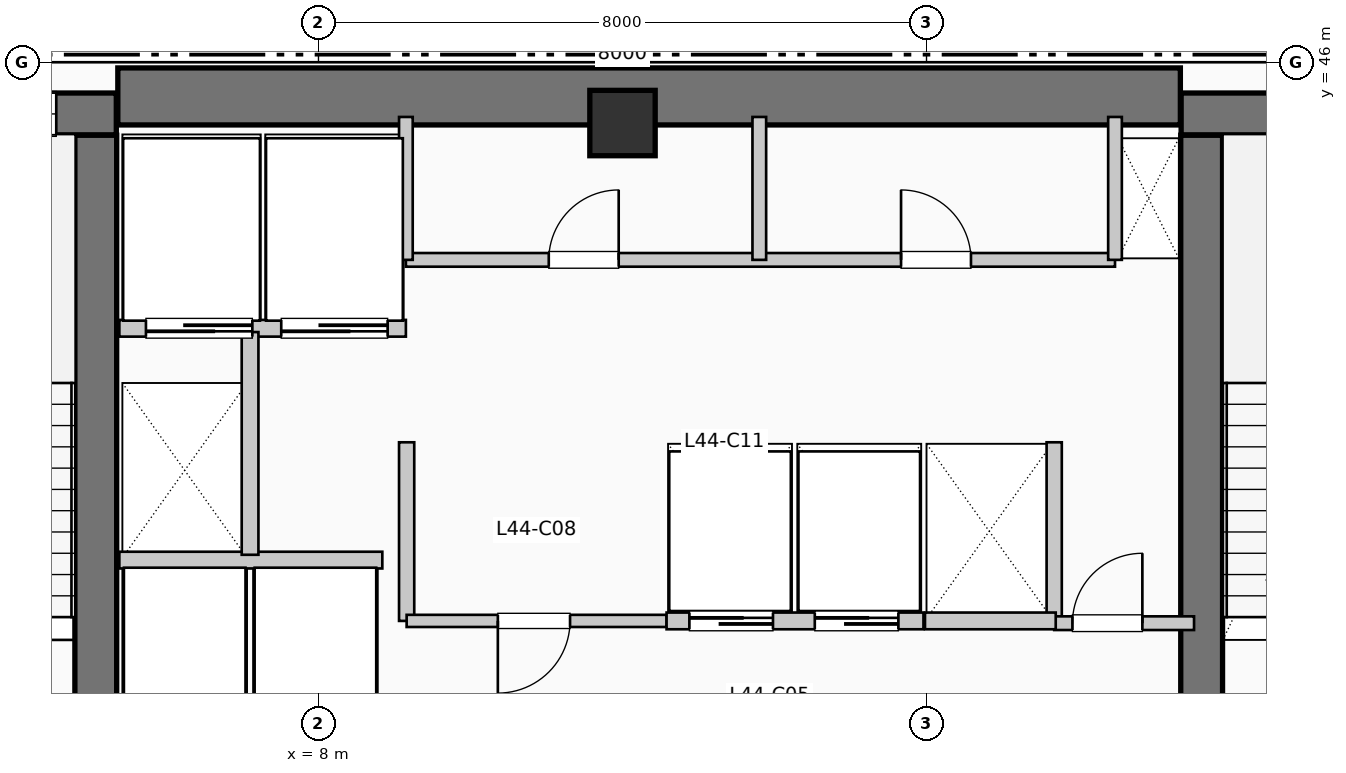
"""IFC4 building model, lengths in metres.
Left out: names, types, materials, properties, quantities, classifications, styles, units other than length and angle.
Written with IfcOpenShell. Run it as: python <this file> out.ifc"""

import sys

from ifc_helpers import new_model, si_unit, direction, frame, frame_2d, origin, origin_2d, place, context, subcontext, project, spatial, rectangle, extrude, element, fill, save


model = new_model("IFC4")
c1 = context("Model", 3, precision=1e-05, world=origin(), true_north=direction((0.0, 1.0)))
c2 = subcontext(c1, "Body", "Model", "MODEL_VIEW")
j1 = project(units=[si_unit("LENGTHUNIT", "METRE"), si_unit("PLANEANGLEUNIT", "RADIAN")], contexts=[c1])
p1 = place(None, origin())
s1 = spatial("IfcSite", under=j1, at=p1, CompositionType="ELEMENT")
p2 = place(p1, origin())
s2 = spatial("IfcBuilding", under=s1, at=p2, CompositionType="ELEMENT")
p3 = place(p2, frame((0.0, 0.0, 183.48)))
s3 = spatial("IfcBuildingStorey", under=s2, at=p3, CompositionType="ELEMENT", Elevation=183.48)
p4 = place(p3, frame((5.36, 45.55, 0.0), z_axis=(0.0, 0.0, 1.0), x_axis=(1.0, 0.0, 0.0)))
e1 = element("IfcWall", 1, at=p4, inside=s3, PredefinedType="SHEAR", context=c2, shape_type="SweptSolid", body=[
    extrude(rectangle(XDim=13.98, YDim=0.75, at=frame_2d((6.99, 0.0))), origin(), (0.0, 0.0, 1.0), 3.96),
])
p5 = place(p3, frame((5.07, 37.15, 0.0), z_axis=(0.0, 0.0, 1.0), x_axis=(0.0, 1.0, 0.0)))
e2 = element("IfcWall", 2, at=p5, inside=s3, PredefinedType="SHEAR", context=c2, shape_type="SweptSolid", body=[
    extrude(rectangle(XDim=7.89, YDim=0.55, at=frame_2d((3.945, 0.0))), origin(), (0.0, 0.0, 1.0), 3.96),
])
p6 = place(p3, frame((1.1, 45.32, 0.0), z_axis=(0.0, 0.0, 1.0), x_axis=(1.0, 0.0, 0.0)))
e3 = element("IfcWall", 3, at=p6, inside=s3, PredefinedType="SHEAR", context=c2, shape_type="SweptSolid", body=[
    extrude(rectangle(XDim=4.24, YDim=0.55, at=frame_2d((2.12, 0.0))), origin(), (0.0, 0.0, 1.0), 3.96),
])
p7 = place(p6, frame((2.05, 0.0, 1.05)))
e4 = element("IfcOpeningElement", 4, at=p7, cuts=e3, PredefinedType="OPENING", context=c2, shape_type="SweptSolid", body=[
    extrude(rectangle(XDim=1.4, YDim=1.8, at=frame_2d((0.7, 0.9))), frame((0.0, 0.285, 0.0), z_axis=(0.0, -1.0, 0.0), x_axis=(1.0, 0.0, 0.0)), (0.0, 0.0, 1.0), 0.57),
])
p8 = place(p3, frame((19.62, 37.15, 0.0), z_axis=(0.0, 0.0, 1.0), x_axis=(0.0, 1.0, 0.0)))
e5 = element("IfcWall", 5, at=p8, inside=s3, PredefinedType="SHEAR", context=c2, shape_type="SweptSolid", body=[
    extrude(rectangle(XDim=7.89, YDim=0.55, at=frame_2d((3.945, 0.0))), origin(), (0.0, 0.0, 1.0), 3.96),
])
p9 = place(p3, frame((19.35, 45.32, 0.0), z_axis=(0.0, 0.0, 1.0), x_axis=(1.0, 0.0, 0.0)))
e6 = element("IfcWall", 6, at=p9, inside=s3, PredefinedType="SHEAR", context=c2, shape_type="SweptSolid", body=[
    extrude(rectangle(XDim=3.69, YDim=0.55, at=frame_2d((1.845, 0.0))), origin(), (0.0, 0.0, 1.0), 3.96),
])
p10 = place(p9, frame((1.15, 0.0, 1.05)))
e7 = element("IfcOpeningElement", 7, at=p10, cuts=e6, PredefinedType="OPENING", context=c2, shape_type="SweptSolid", body=[
    extrude(rectangle(XDim=1.4, YDim=1.8, at=frame_2d((0.7, 0.9))), frame((0.0, 0.285, 0.0), z_axis=(0.0, -1.0, 0.0), x_axis=(1.0, 0.0, 0.0)), (0.0, 0.0, 1.0), 0.57),
])
p11 = place(p3, frame((12.0, 45.2, 0.0), z_axis=(0.0, 0.0, 1.0), x_axis=(1.0, 0.0, 0.0)))
e8 = element("IfcColumn", 8, at=p11, inside=s3, PredefinedType="COLUMN", context=c2, shape_type="SweptSolid", body=[
    extrude(rectangle(XDim=0.86, YDim=0.86, at=origin_2d()), origin(), (0.0, 0.0, 1.0), 3.96),
])
p12 = place(p3, frame((5.38, 39.45, 0.0), z_axis=(0.0, 0.0, 1.0), x_axis=(1.0, 0.0, 0.0)))
e9 = element("IfcWall", 9, at=p12, inside=s3, PredefinedType="PARTITIONING", context=c2, shape_type="SweptSolid", body=[
    extrude(rectangle(XDim=3.46, YDim=0.22, at=frame_2d((1.73, 0.0))), origin(), (0.0, 0.0, 1.0), 3.71),
])
p13 = place(p3, frame((5.38, 42.5, 0.0), z_axis=(0.0, 0.0, 1.0), x_axis=(1.0, 0.0, 0.0)))
e10 = element("IfcWall", 10, at=p13, inside=s3, PredefinedType="PARTITIONING", context=c2, shape_type="SweptSolid", body=[
    extrude(rectangle(XDim=3.77, YDim=0.22, at=frame_2d((1.885, 0.0))), origin(), (0.0, 0.0, 1.0), 3.71),
])
p14 = place(p13, frame((1.75, 0.0, 0.0), z_axis=(0.0, 0.0, 1.0), x_axis=(-1.0, 0.0, 0.0)))
e11 = element("IfcOpeningElement", 11, at=p14, cuts=e10, PredefinedType="OPENING", context=c2, shape_type="SweptSolid", body=[
    extrude(rectangle(XDim=1.4, YDim=2.2, at=frame_2d((0.7, 1.1))), frame((0.0, 0.12, 0.0), z_axis=(0.0, -1.0, 0.0), x_axis=(1.0, 0.0, 0.0)), (0.0, 0.0, 1.0), 0.24),
])
p15 = place(p13, frame((3.53, 0.0, 0.0), z_axis=(0.0, 0.0, 1.0), x_axis=(-1.0, 0.0, 0.0)))
e12 = element("IfcOpeningElement", 12, at=p15, cuts=e10, PredefinedType="OPENING", context=c2, shape_type="SweptSolid", body=[
    extrude(rectangle(XDim=1.4, YDim=2.2, at=frame_2d((0.7, 1.1))), frame((0.0, 0.12, 0.0), z_axis=(0.0, -1.0, 0.0), x_axis=(1.0, 0.0, 0.0)), (0.0, 0.0, 1.0), 0.24),
])
p16 = place(p3, frame((7.1, 39.52, 0.0), z_axis=(0.0, 0.0, 1.0), x_axis=(0.0, 1.0, 0.0)))
e13 = element("IfcWall", 13, at=p16, inside=s3, PredefinedType="PARTITIONING", context=c2, shape_type="SweptSolid", body=[
    extrude(rectangle(XDim=2.93, YDim=0.22, at=frame_2d((1.465, 0.0))), origin(), (0.0, 0.0, 1.0), 3.71),
])
for number, where, z_axis, x_axis in (
    (14, (9.16, 38.65, 0.0), (0.0, 0.0, 1.0), (0.0, 1.0, 0.0)),
    (15, (17.68, 38.65, 0.0), (0.0, 0.0, 1.0), (0.0, 1.0, 0.0)),
):
    element("IfcWall", number, at=place(p3, frame(where, z_axis=z_axis, x_axis=x_axis)), inside=s3, PredefinedType="PARTITIONING", context=c2, shape_type="SweptSolid", body=[
        extrude(rectangle(XDim=2.35, YDim=0.2, at=frame_2d((1.175, 0.0))), origin(), (0.0, 0.0, 1.0), 3.71),
    ])
p17 = place(p3, frame((17.68, 38.62, 0.0), z_axis=(0.0, 0.0, 1.0), x_axis=(1.0, 0.0, 0.0)))
e16 = element("IfcWall", 16, at=p17, inside=s3, PredefinedType="PARTITIONING", context=c2, shape_type="SweptSolid", body=[
    extrude(rectangle(XDim=1.84, YDim=0.18, at=frame_2d((0.92, 0.0))), origin(), (0.0, 0.0, 1.0), 3.71),
])
p18 = place(p17, frame((0.24, 0.0, 0.0)))
e17 = element("IfcOpeningElement", 17, at=p18, cuts=e16, PredefinedType="OPENING", context=c2, shape_type="SweptSolid", body=[
    extrude(rectangle(XDim=0.92, YDim=2.1, at=frame_2d((0.46, 1.05))), frame((0.0, 0.1, 0.0), z_axis=(0.0, -1.0, 0.0), x_axis=(1.0, 0.0, 0.0)), (0.0, 0.0, 1.0), 0.2),
])
p19 = place(p3, frame((9.16, 38.65, 0.0), z_axis=(0.0, 0.0, 1.0), x_axis=(1.0, 0.0, 0.0)))
e18 = element("IfcWall", 18, at=p19, inside=s3, PredefinedType="PARTITIONING", context=c2, shape_type="SweptSolid", body=[
    extrude(rectangle(XDim=3.42, YDim=0.16, at=frame_2d((1.71, 0.0))), origin(), (0.0, 0.0, 1.0), 3.71),
])
p20 = place(p19, frame((2.15, 0.0, 0.0), z_axis=(0.0, 0.0, 1.0), x_axis=(-1.0, 0.0, 0.0)))
e19 = element("IfcOpeningElement", 19, at=p20, cuts=e18, PredefinedType="OPENING", context=c2, shape_type="SweptSolid", body=[
    extrude(rectangle(XDim=0.95, YDim=2.15, at=frame_2d((0.475, 1.075))), frame((0.0, 0.09, 0.0), z_axis=(0.0, -1.0, 0.0), x_axis=(1.0, 0.0, 0.0)), (0.0, 0.0, 1.0), 0.18),
])
p21 = place(p3, frame((12.58, 38.65, 0.0), z_axis=(0.0, 0.0, 1.0), x_axis=(1.0, 0.0, 0.0)))
e20 = element("IfcWall", 20, at=p21, inside=s3, PredefinedType="PARTITIONING", context=c2, shape_type="SweptSolid", body=[
    extrude(rectangle(XDim=3.38, YDim=0.22, at=frame_2d((1.69, 0.0))), origin(), (0.0, 0.0, 1.0), 3.71),
])
p22 = place(p21, frame((0.3, 0.0, 0.0)))
e21 = element("IfcOpeningElement", 21, at=p22, cuts=e20, PredefinedType="OPENING", context=c2, shape_type="SweptSolid", body=[
    extrude(rectangle(XDim=1.1, YDim=2.2, at=frame_2d((0.55, 1.1))), frame((0.0, 0.12, 0.0), z_axis=(0.0, -1.0, 0.0), x_axis=(1.0, 0.0, 0.0)), (0.0, 0.0, 1.0), 0.24),
])
p23 = place(p21, frame((1.95, 0.0, 0.0)))
e22 = element("IfcOpeningElement", 22, at=p23, cuts=e20, PredefinedType="OPENING", context=c2, shape_type="SweptSolid", body=[
    extrude(rectangle(XDim=1.1, YDim=2.2, at=frame_2d((0.55, 1.1))), frame((0.0, 0.12, 0.0), z_axis=(0.0, -1.0, 0.0), x_axis=(1.0, 0.0, 0.0)), (0.0, 0.0, 1.0), 0.24),
])
p24 = place(p3, frame((15.98, 38.65, 0.0), z_axis=(0.0, 0.0, 1.0), x_axis=(1.0, 0.0, 0.0)))
e23 = element("IfcWall", 23, at=p24, inside=s3, PredefinedType="PARTITIONING", context=c2, shape_type="SweptSolid", body=[
    extrude(rectangle(XDim=1.72, YDim=0.22, at=frame_2d((0.86, 0.0))), origin(), (0.0, 0.0, 1.0), 3.71),
])
p25 = place(p3, frame((9.15, 43.4, 0.0), z_axis=(0.0, 0.0, 1.0), x_axis=(1.0, 0.0, 0.0)))
e24 = element("IfcWall", 24, at=p25, inside=s3, PredefinedType="PLUMBINGWALL", context=c2, shape_type="SweptSolid", body=[
    extrude(rectangle(XDim=9.33, YDim=0.18, at=frame_2d((4.665, 0.0))), origin(), (0.0, 0.0, 1.0), 3.71),
])
p26 = place(p25, frame((1.88, 0.0, 0.0)))
e25 = element("IfcOpeningElement", 25, at=p26, cuts=e24, PredefinedType="OPENING", context=c2, shape_type="SweptSolid", body=[
    extrude(rectangle(XDim=0.92, YDim=2.1, at=frame_2d((0.46, 1.05))), frame((0.0, 0.1, 0.0), z_axis=(0.0, -1.0, 0.0), x_axis=(1.0, 0.0, 0.0)), (0.0, 0.0, 1.0), 0.2),
])
p27 = place(p25, frame((6.515, 0.0, 0.0)))
e26 = element("IfcOpeningElement", 26, at=p27, cuts=e24, PredefinedType="OPENING", context=c2, shape_type="SweptSolid", body=[
    extrude(rectangle(XDim=0.92, YDim=2.1, at=frame_2d((0.46, 1.05))), frame((0.0, 0.1, 0.0), z_axis=(0.0, -1.0, 0.0), x_axis=(1.0, 0.0, 0.0)), (0.0, 0.0, 1.0), 0.2),
])
for number, where, z_axis, x_axis in (
    (27, (9.15, 43.4, 0.0), (0.0, 0.0, 1.0), (0.0, 1.0, 0.0)),
    (28, (18.48, 43.4, 0.0), (0.0, 0.0, 1.0), (0.0, 1.0, 0.0)),
    (29, (13.8, 43.4, 0.0), (0.0, 0.0, 1.0), (0.0, 1.0, 0.0)),
):
    element("IfcWall", number, at=place(p3, frame(where, z_axis=z_axis, x_axis=x_axis)), inside=s3, PredefinedType="PLUMBINGWALL", context=c2, shape_type="SweptSolid", body=[
        extrude(rectangle(XDim=1.88, YDim=0.18, at=frame_2d((0.94, 0.0))), origin(), (0.0, 0.0, 1.0), 3.71),
    ])
p28 = place(p7, origin())
e30 = element("IfcWindow", 30, at=p28, inside=s3, PartitioningType="SINGLE_PANEL", PredefinedType="WINDOW", context=c2, shape_type="SweptSolid", body=[
    extrude(rectangle(XDim=1.4, YDim=1.8, at=frame_2d((0.7, 0.9))), frame((0.0, 0.03, 0.0), z_axis=(0.0, -1.0, 0.0), x_axis=(1.0, 0.0, 0.0)), (0.0, 0.0, 1.0), 0.06),
])
fill(e4, e30)
p29 = place(p14, origin())
e31 = element("IfcDoor", 31, at=p29, inside=s3, OperationType="SLIDING_TO_LEFT", PredefinedType="DOOR", context=c2, shape_type="SweptSolid", body=[
    extrude(rectangle(XDim=1.4, YDim=2.2, at=frame_2d((0.7, 1.1))), frame((0.0, 0.025, 0.0), z_axis=(0.0, -1.0, 0.0), x_axis=(1.0, 0.0, 0.0)), (0.0, 0.0, 1.0), 0.05),
])
fill(e11, e31)
p30 = place(p15, origin())
e32 = element("IfcDoor", 32, at=p30, inside=s3, OperationType="SLIDING_TO_LEFT", PredefinedType="DOOR", context=c2, shape_type="SweptSolid", body=[
    extrude(rectangle(XDim=1.4, YDim=2.2, at=frame_2d((0.7, 1.1))), frame((0.0, 0.025, 0.0), z_axis=(0.0, -1.0, 0.0), x_axis=(1.0, 0.0, 0.0)), (0.0, 0.0, 1.0), 0.05),
])
fill(e12, e32)
p31 = place(p18, origin())
e33 = element("IfcDoor", 33, at=p31, inside=s3, OperationType="SINGLE_SWING_RIGHT", PredefinedType="DOOR", context=c2, shape_type="SweptSolid", body=[
    extrude(rectangle(XDim=0.92, YDim=2.1, at=frame_2d((0.46, 1.05))), frame((0.0, 0.025, 0.0), z_axis=(0.0, -1.0, 0.0), x_axis=(1.0, 0.0, 0.0)), (0.0, 0.0, 1.0), 0.05),
])
fill(e17, e33)
p32 = place(p20, origin())
e34 = element("IfcDoor", 34, at=p32, inside=s3, OperationType="SINGLE_SWING_LEFT", PredefinedType="DOOR", context=c2, shape_type="SweptSolid", body=[
    extrude(rectangle(XDim=0.95, YDim=2.15, at=frame_2d((0.475, 1.075))), frame((0.0, 0.025, 0.0), z_axis=(0.0, -1.0, 0.0), x_axis=(1.0, 0.0, 0.0)), (0.0, 0.0, 1.0), 0.05),
])
fill(e19, e34)
p33 = place(p22, origin())
e35 = element("IfcDoor", 35, at=p33, inside=s3, OperationType="SLIDING_TO_RIGHT", PredefinedType="DOOR", context=c2, shape_type="SweptSolid", body=[
    extrude(rectangle(XDim=1.1, YDim=2.2, at=frame_2d((0.55, 1.1))), frame((0.0, 0.025, 0.0), z_axis=(0.0, -1.0, 0.0), x_axis=(1.0, 0.0, 0.0)), (0.0, 0.0, 1.0), 0.05),
])
fill(e21, e35)
p34 = place(p23, origin())
e36 = element("IfcDoor", 36, at=p34, inside=s3, OperationType="SLIDING_TO_RIGHT", PredefinedType="DOOR", context=c2, shape_type="SweptSolid", body=[
    extrude(rectangle(XDim=1.1, YDim=2.2, at=frame_2d((0.55, 1.1))), frame((0.0, 0.025, 0.0), z_axis=(0.0, -1.0, 0.0), x_axis=(1.0, 0.0, 0.0)), (0.0, 0.0, 1.0), 0.05),
])
fill(e22, e36)
p35 = place(p26, origin())
e37 = element("IfcDoor", 37, at=p35, inside=s3, OperationType="SINGLE_SWING_RIGHT", PredefinedType="DOOR", context=c2, shape_type="SweptSolid", body=[
    extrude(rectangle(XDim=0.92, YDim=2.1, at=frame_2d((0.46, 1.05))), frame((0.0, 0.025, 0.0), z_axis=(0.0, -1.0, 0.0), x_axis=(1.0, 0.0, 0.0)), (0.0, 0.0, 1.0), 0.05),
])
fill(e25, e37)
p36 = place(p27, origin())
e38 = element("IfcDoor", 38, at=p36, inside=s3, OperationType="SINGLE_SWING_LEFT", PredefinedType="DOOR", context=c2, shape_type="SweptSolid", body=[
    extrude(rectangle(XDim=0.92, YDim=2.1, at=frame_2d((0.46, 1.05))), frame((0.0, 0.025, 0.0), z_axis=(0.0, -1.0, 0.0), x_axis=(1.0, 0.0, 0.0)), (0.0, 0.0, 1.0), 0.05),
])
fill(e26, e38)
save(model, sys.argv[1])
